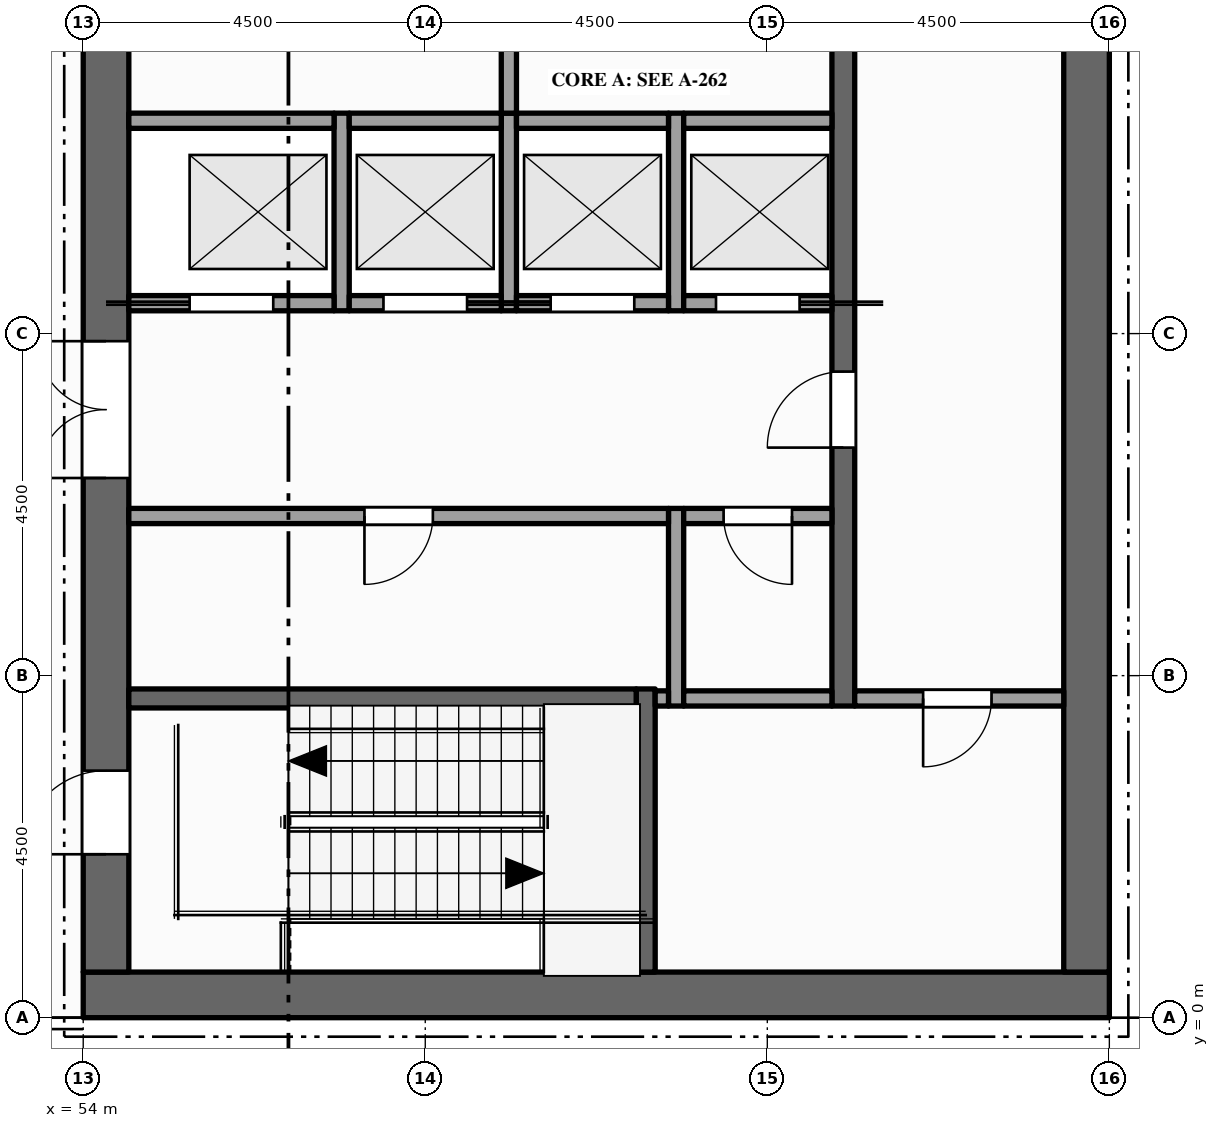
"""IFC4 building model, lengths in metres.
Left out: names, types, materials, properties, quantities, classifications, styles, units other than length and angle.
Written with IfcOpenShell. Run it as: python <this file> out.ifc"""

import sys

from ifc_helpers import new_model, si_unit, direction, frame, frame_2d, origin, place, context, subcontext, project, spatial, rectangle, extrude, element, fill, save


model = new_model("IFC4")
c1 = context("Model", 3, precision=1e-05, world=origin(), true_north=direction((0.0, 1.0)))
c2 = subcontext(c1, "Body", "Model", "MODEL_VIEW")
j1 = project(units=[si_unit("LENGTHUNIT", "METRE"), si_unit("PLANEANGLEUNIT", "RADIAN")], contexts=[c1])
p1 = place(None, origin())
s1 = spatial("IfcSite", under=j1, at=p1, CompositionType="ELEMENT")
p2 = place(p1, origin())
s2 = spatial("IfcBuilding", under=s1, at=p2, CompositionType="ELEMENT")
p3 = place(p2, frame((0.0, 0.0, 341.0)))
s3 = spatial("IfcBuildingStorey", under=s2, at=p3, CompositionType="ELEMENT", Elevation=341.0)
p4 = place(p3, frame((67.5, 0.3, -0.15), z_axis=(0.0, 0.0, 1.0), x_axis=(-1.0, 0.0, 0.0)))
e1 = element("IfcWall", 1, at=p4, inside=s3, PredefinedType="SHEAR", context=c2, shape_type="SweptSolid", body=[
    extrude(rectangle(XDim=13.5, YDim=0.6, at=frame_2d((6.75, 0.0))), origin(), (0.0, 0.0, 1.0), 4.5),
])
p5 = place(p3, frame((54.3, 0.6, -0.15), z_axis=(0.0, 0.0, 1.0), x_axis=(0.0, 1.0, 0.0)))
e2 = element("IfcWall", 2, at=p5, inside=s3, PredefinedType="SHEAR", context=c2, shape_type="SweptSolid", body=[
    extrude(rectangle(XDim=21.3, YDim=0.6, at=frame_2d((10.65, 0.0))), origin(), (0.0, 0.0, 1.0), 4.5),
])
p6 = place(p5, frame((6.5, 0.0, 0.15)))
e3 = element("IfcOpeningElement", 3, at=p6, cuts=e2, PredefinedType="OPENING", context=c2, shape_type="SweptSolid", body=[
    extrude(rectangle(XDim=1.8, YDim=2.1, at=frame_2d((0.9, 1.05))), frame((0.0, 0.31, 0.0), z_axis=(0.0, -1.0, 0.0), x_axis=(1.0, 0.0, 0.0)), (0.0, 0.0, 1.0), 0.62),
])
p7 = place(p5, frame((12.55, 0.0, 0.15)))
e4 = element("IfcOpeningElement", 4, at=p7, cuts=e2, PredefinedType="OPENING", context=c2, shape_type="SweptSolid", body=[
    extrude(rectangle(XDim=1.1, YDim=2.1, at=frame_2d((0.55, 1.05))), frame((0.0, 0.31, 0.0), z_axis=(0.0, -1.0, 0.0), x_axis=(1.0, 0.0, 0.0)), (0.0, 0.0, 1.0), 0.62),
])
p8 = place(p5, frame((1.55, 0.0, 0.15)))
e5 = element("IfcOpeningElement", 5, at=p8, cuts=e2, PredefinedType="OPENING", context=c2, shape_type="SweptSolid", body=[
    extrude(rectangle(XDim=1.1, YDim=2.1, at=frame_2d((0.55, 1.05))), frame((0.0, 0.31, 0.0), z_axis=(0.0, -1.0, 0.0), x_axis=(1.0, 0.0, 0.0)), (0.0, 0.0, 1.0), 0.62),
])
p9 = place(p5, frame((18.75, 0.0, 0.15)))
e6 = element("IfcOpeningElement", 6, at=p9, cuts=e2, PredefinedType="OPENING", context=c2, shape_type="SweptSolid", body=[
    extrude(rectangle(XDim=1.1, YDim=2.1, at=frame_2d((0.55, 1.05))), frame((0.0, 0.31, 0.0), z_axis=(0.0, -1.0, 0.0), x_axis=(1.0, 0.0, 0.0)), (0.0, 0.0, 1.0), 0.62),
])
p10 = place(p3, frame((67.2, 0.6, -0.15), z_axis=(0.0, 0.0, 1.0), x_axis=(0.0, 1.0, 0.0)))
e7 = element("IfcWall", 7, at=p10, inside=s3, PredefinedType="SHEAR", context=c2, shape_type="SweptSolid", body=[
    extrude(rectangle(XDim=21.3, YDim=0.6, at=frame_2d((10.65, 0.0))), origin(), (0.0, 0.0, 1.0), 4.5),
])
for number, where, z_axis, x_axis in (
    (8, (57.4, 9.3, 0.0), (0.0, 0.0, 1.0), (0.0, 1.0, 0.0)),
    (9, (59.6, 9.3, 0.0), (0.0, 0.0, 1.0), (0.0, 1.0, 0.0)),
):
    element("IfcWall", number, at=place(p3, frame(where, z_axis=z_axis, x_axis=x_axis)), inside=s3, PredefinedType="SOLIDWALL", context=c2, shape_type="SweptSolid", body=[
        extrude(rectangle(XDim=2.6, YDim=0.2, at=frame_2d((1.3, 0.0))), origin(), (0.0, 0.0, 1.0), 4.3),
    ])
p11 = place(p3, frame((59.6, 11.9, 0.0), z_axis=(0.0, 0.0, 1.0), x_axis=(0.0, 1.0, 0.0)))
e10 = element("IfcWall", 10, at=p11, inside=s3, PredefinedType="PARTITIONING", context=c2, shape_type="SweptSolid", body=[
    extrude(rectangle(XDim=3.6, YDim=0.2, at=frame_2d((1.8, 0.0))), origin(), (0.0, 0.0, 1.0), 4.3),
])
p12 = place(p11, frame((1.3, 0.0, 0.0)))
e11 = element("IfcOpeningElement", 11, at=p12, cuts=e10, PredefinedType="OPENING", context=c2, shape_type="SweptSolid", body=[
    extrude(rectangle(XDim=1.0, YDim=2.1, at=frame_2d((0.5, 1.05))), frame((0.0, 0.11, 0.0), z_axis=(0.0, -1.0, 0.0), x_axis=(1.0, 0.0, 0.0)), (0.0, 0.0, 1.0), 0.22),
])
p13 = place(p3, frame((61.4, 0.6, 0.0), z_axis=(0.0, 0.0, 1.0), x_axis=(0.0, 1.0, 0.0)))
e12 = element("IfcWall", 12, at=p13, inside=s3, PredefinedType="SHEAR", context=c2, shape_type="SweptSolid", body=[
    extrude(rectangle(XDim=3.725, YDim=0.25, at=frame_2d((1.862, 0.0))), origin(), (0.0, 0.0, 1.0), 4.3),
])
p14 = place(p3, frame((61.8, 4.1, 0.0), z_axis=(0.0, 0.0, 1.0), x_axis=(0.0, 1.0, 0.0)))
e13 = element("IfcWall", 13, at=p14, inside=s3, PredefinedType="PARTITIONING", context=c2, shape_type="SweptSolid", body=[
    extrude(rectangle(XDim=2.6, YDim=0.2, at=frame_2d((1.3, 0.0))), origin(), (0.0, 0.0, 1.0), 4.3),
])
p15 = place(p3, frame((61.8, 9.3, 0.0), z_axis=(0.0, 0.0, 1.0), x_axis=(0.0, 1.0, 0.0)))
e14 = element("IfcWall", 14, at=p15, inside=s3, PredefinedType="SOLIDWALL", context=c2, shape_type="SweptSolid", body=[
    extrude(rectangle(XDim=2.6, YDim=0.2, at=frame_2d((1.3, 0.0))), origin(), (0.0, 0.0, 1.0), 4.3),
])
p16 = place(p3, frame((64.0, 4.1, 0.0), z_axis=(0.0, 0.0, 1.0), x_axis=(0.0, 1.0, 0.0)))
e15 = element("IfcWall", 15, at=p16, inside=s3, PredefinedType="SHEAR", context=c2, shape_type="SweptSolid", body=[
    extrude(rectangle(XDim=14.5, YDim=0.3, at=frame_2d((7.25, 0.0))), origin(), (0.0, 0.0, 1.0), 4.3),
])
p17 = place(p16, frame((3.4, 0.0, 0.0)))
e16 = element("IfcOpeningElement", 16, at=p17, cuts=e15, PredefinedType="OPENING", context=c2, shape_type="SweptSolid", body=[
    extrude(rectangle(XDim=1.0, YDim=2.1, at=frame_2d((0.5, 1.05))), frame((0.0, 0.16, 0.0), z_axis=(0.0, -1.0, 0.0), x_axis=(1.0, 0.0, 0.0)), (0.0, 0.0, 1.0), 0.32),
])
p18 = place(p16, frame((9.1, 0.0, 0.0)))
e17 = element("IfcOpeningElement", 17, at=p18, cuts=e15, PredefinedType="OPENING", context=c2, shape_type="SweptSolid", body=[
    extrude(rectangle(XDim=1.0, YDim=2.1, at=frame_2d((0.5, 1.05))), frame((0.0, 0.16, 0.0), z_axis=(0.0, -1.0, 0.0), x_axis=(1.0, 0.0, 0.0)), (0.0, 0.0, 1.0), 0.32),
])
p19 = place(p3, frame((54.6, 4.2, 0.0), z_axis=(0.0, 0.0, 1.0), x_axis=(1.0, 0.0, 0.0)))
e18 = element("IfcWall", 18, at=p19, inside=s3, PredefinedType="SHEAR", context=c2, shape_type="SweptSolid", body=[
    extrude(rectangle(XDim=6.675, YDim=0.25, at=frame_2d((3.337, 0.0))), origin(), (0.0, 0.0, 1.0), 4.3),
])
p20 = place(p3, frame((61.525, 4.2, 0.0), z_axis=(0.0, 0.0, 1.0), x_axis=(1.0, 0.0, 0.0)))
e19 = element("IfcWall", 19, at=p20, inside=s3, PredefinedType="PARTITIONING", context=c2, shape_type="SweptSolid", body=[
    extrude(rectangle(XDim=0.175, YDim=0.2, at=frame_2d((0.087, 0.0))), origin(), (0.0, 0.0, 1.0), 4.3),
])
p21 = place(p3, frame((61.9, 4.2, 0.0), z_axis=(0.0, 0.0, 1.0), x_axis=(1.0, 0.0, 0.0)))
e20 = element("IfcWall", 20, at=p21, inside=s3, PredefinedType="PARTITIONING", context=c2, shape_type="SweptSolid", body=[
    extrude(rectangle(XDim=1.95, YDim=0.2, at=frame_2d((0.975, 0.0))), origin(), (0.0, 0.0, 1.0), 4.3),
])
p22 = place(p3, frame((64.15, 4.2, 0.0), z_axis=(0.0, 0.0, 1.0), x_axis=(1.0, 0.0, 0.0)))
e21 = element("IfcWall", 21, at=p22, inside=s3, PredefinedType="PARTITIONING", context=c2, shape_type="SweptSolid", body=[
    extrude(rectangle(XDim=2.75, YDim=0.2, at=frame_2d((1.375, 0.0))), origin(), (0.0, 0.0, 1.0), 4.3),
])
p23 = place(p22, frame((0.9, 0.0, 0.0)))
e22 = element("IfcOpeningElement", 22, at=p23, cuts=e21, PredefinedType="OPENING", context=c2, shape_type="SweptSolid", body=[
    extrude(rectangle(XDim=0.9, YDim=2.1, at=frame_2d((0.45, 1.05))), frame((0.0, 0.11, 0.0), z_axis=(0.0, -1.0, 0.0), x_axis=(1.0, 0.0, 0.0)), (0.0, 0.0, 1.0), 0.22),
])
p24 = place(p3, frame((54.6, 6.6, 0.0), z_axis=(0.0, 0.0, 1.0), x_axis=(1.0, 0.0, 0.0)))
e23 = element("IfcWall", 23, at=p24, inside=s3, PredefinedType="PARTITIONING", context=c2, shape_type="SweptSolid", body=[
    extrude(rectangle(XDim=7.1, YDim=0.2, at=frame_2d((3.55, 0.0))), origin(), (0.0, 0.0, 1.0), 4.3),
])
p25 = place(p24, frame((3.1, 0.0, 0.0)))
e24 = element("IfcOpeningElement", 24, at=p25, cuts=e23, PredefinedType="OPENING", context=c2, shape_type="SweptSolid", body=[
    extrude(rectangle(XDim=0.9, YDim=2.1, at=frame_2d((0.45, 1.05))), frame((0.0, 0.11, 0.0), z_axis=(0.0, -1.0, 0.0), x_axis=(1.0, 0.0, 0.0)), (0.0, 0.0, 1.0), 0.22),
])
p26 = place(p3, frame((61.9, 6.6, 0.0), z_axis=(0.0, 0.0, 1.0), x_axis=(1.0, 0.0, 0.0)))
e25 = element("IfcWall", 25, at=p26, inside=s3, PredefinedType="PARTITIONING", context=c2, shape_type="SweptSolid", body=[
    extrude(rectangle(XDim=1.95, YDim=0.2, at=frame_2d((0.975, 0.0))), origin(), (0.0, 0.0, 1.0), 4.3),
])
p27 = place(p26, frame((0.525, 0.0, 0.0)))
e26 = element("IfcOpeningElement", 26, at=p27, cuts=e25, PredefinedType="OPENING", context=c2, shape_type="SweptSolid", body=[
    extrude(rectangle(XDim=0.9, YDim=2.1, at=frame_2d((0.45, 1.05))), frame((0.0, 0.11, 0.0), z_axis=(0.0, -1.0, 0.0), x_axis=(1.0, 0.0, 0.0)), (0.0, 0.0, 1.0), 0.22),
])
p28 = place(p3, frame((54.6, 9.4, 0.0), z_axis=(0.0, 0.0, 1.0), x_axis=(1.0, 0.0, 0.0)))
e27 = element("IfcWall", 27, at=p28, inside=s3, PredefinedType="SOLIDWALL", context=c2, shape_type="SweptSolid", body=[
    extrude(rectangle(XDim=2.7, YDim=0.2, at=frame_2d((1.35, 0.0))), origin(), (0.0, 0.0, 1.0), 4.3),
])
p29 = place(p28, frame((0.8, 0.0, 0.012)))
e28 = element("IfcOpeningElement", 28, at=p29, cuts=e27, PredefinedType="OPENING", context=c2, shape_type="SweptSolid", body=[
    extrude(rectangle(XDim=1.1, YDim=2.1, at=frame_2d((0.55, 1.05))), frame((0.0, 0.11, 0.0), z_axis=(0.0, -1.0, 0.0), x_axis=(1.0, 0.0, 0.0)), (0.0, 0.0, 1.0), 0.22),
])
p30 = place(p3, frame((57.5, 9.4, 0.0), z_axis=(0.0, 0.0, 1.0), x_axis=(1.0, 0.0, 0.0)))
e29 = element("IfcWall", 29, at=p30, inside=s3, PredefinedType="SOLIDWALL", context=c2, shape_type="SweptSolid", body=[
    extrude(rectangle(XDim=2.0, YDim=0.2, at=frame_2d((1.0, 0.0))), origin(), (0.0, 0.0, 1.0), 4.3),
])
p31 = place(p30, frame((0.45, 0.0, 0.012)))
e30 = element("IfcOpeningElement", 30, at=p31, cuts=e29, PredefinedType="OPENING", context=c2, shape_type="SweptSolid", body=[
    extrude(rectangle(XDim=1.1, YDim=2.1, at=frame_2d((0.55, 1.05))), frame((0.0, 0.11, 0.0), z_axis=(0.0, -1.0, 0.0), x_axis=(1.0, 0.0, 0.0)), (0.0, 0.0, 1.0), 0.22),
])
p32 = place(p3, frame((59.7, 9.4, 0.0), z_axis=(0.0, 0.0, 1.0), x_axis=(1.0, 0.0, 0.0)))
e31 = element("IfcWall", 31, at=p32, inside=s3, PredefinedType="SOLIDWALL", context=c2, shape_type="SweptSolid", body=[
    extrude(rectangle(XDim=2.0, YDim=0.2, at=frame_2d((1.0, 0.0))), origin(), (0.0, 0.0, 1.0), 4.3),
])
p33 = place(p32, frame((0.45, 0.0, 0.012)))
e32 = element("IfcOpeningElement", 32, at=p33, cuts=e31, PredefinedType="OPENING", context=c2, shape_type="SweptSolid", body=[
    extrude(rectangle(XDim=1.1, YDim=2.1, at=frame_2d((0.55, 1.05))), frame((0.0, 0.11, 0.0), z_axis=(0.0, -1.0, 0.0), x_axis=(1.0, 0.0, 0.0)), (0.0, 0.0, 1.0), 0.22),
])
p34 = place(p3, frame((61.9, 9.4, 0.0), z_axis=(0.0, 0.0, 1.0), x_axis=(1.0, 0.0, 0.0)))
e33 = element("IfcWall", 33, at=p34, inside=s3, PredefinedType="SOLIDWALL", context=c2, shape_type="SweptSolid", body=[
    extrude(rectangle(XDim=1.95, YDim=0.2, at=frame_2d((0.975, 0.0))), origin(), (0.0, 0.0, 1.0), 4.3),
])
p35 = place(p34, frame((0.425, 0.0, 0.012)))
e34 = element("IfcOpeningElement", 34, at=p35, cuts=e33, PredefinedType="OPENING", context=c2, shape_type="SweptSolid", body=[
    extrude(rectangle(XDim=1.1, YDim=2.1, at=frame_2d((0.55, 1.05))), frame((0.0, 0.11, 0.0), z_axis=(0.0, -1.0, 0.0), x_axis=(1.0, 0.0, 0.0)), (0.0, 0.0, 1.0), 0.22),
])
p36 = place(p3, frame((54.6, 11.8, 0.0), z_axis=(0.0, 0.0, 1.0), x_axis=(1.0, 0.0, 0.0)))
e35 = element("IfcWall", 35, at=p36, inside=s3, PredefinedType="SOLIDWALL", context=c2, shape_type="SweptSolid", body=[
    extrude(rectangle(XDim=2.7, YDim=0.2, at=frame_2d((1.35, 0.0))), origin(), (0.0, 0.0, 1.0), 4.3),
])
for number, where, z_axis, x_axis in (
    (36, (57.5, 11.8, 0.0), (0.0, 0.0, 1.0), (1.0, 0.0, 0.0)),
    (37, (59.7, 11.8, 0.0), (0.0, 0.0, 1.0), (1.0, 0.0, 0.0)),
):
    element("IfcWall", number, at=place(p3, frame(where, z_axis=z_axis, x_axis=x_axis)), inside=s3, PredefinedType="SOLIDWALL", context=c2, shape_type="SweptSolid", body=[
        extrude(rectangle(XDim=2.0, YDim=0.2, at=frame_2d((1.0, 0.0))), origin(), (0.0, 0.0, 1.0), 4.3),
    ])
p37 = place(p3, frame((61.9, 11.8, 0.0), z_axis=(0.0, 0.0, 1.0), x_axis=(1.0, 0.0, 0.0)))
e38 = element("IfcWall", 38, at=p37, inside=s3, PredefinedType="SOLIDWALL", context=c2, shape_type="SweptSolid", body=[
    extrude(rectangle(XDim=1.95, YDim=0.2, at=frame_2d((0.975, 0.0))), origin(), (0.0, 0.0, 1.0), 4.3),
])
p38 = place(p29, origin())
e39 = element("IfcDoor", 39, at=p38, inside=s3, OperationType="SLIDING_TO_LEFT", PredefinedType="DOOR", context=c2, shape_type="SweptSolid", body=[
    extrude(rectangle(XDim=1.1, YDim=2.1, at=frame_2d((0.55, 1.05))), frame((0.0, 0.025, 0.0), z_axis=(0.0, -1.0, 0.0), x_axis=(1.0, 0.0, 0.0)), (0.0, 0.0, 1.0), 0.05),
])
fill(e28, e39)
p39 = place(p31, origin())
e40 = element("IfcDoor", 40, at=p39, inside=s3, OperationType="SLIDING_TO_RIGHT", PredefinedType="DOOR", context=c2, shape_type="SweptSolid", body=[
    extrude(rectangle(XDim=1.1, YDim=2.1, at=frame_2d((0.55, 1.05))), frame((0.0, 0.025, 0.0), z_axis=(0.0, -1.0, 0.0), x_axis=(1.0, 0.0, 0.0)), (0.0, 0.0, 1.0), 0.05),
])
fill(e30, e40)
p40 = place(p33, origin())
e41 = element("IfcDoor", 41, at=p40, inside=s3, OperationType="SLIDING_TO_LEFT", PredefinedType="DOOR", context=c2, shape_type="SweptSolid", body=[
    extrude(rectangle(XDim=1.1, YDim=2.1, at=frame_2d((0.55, 1.05))), frame((0.0, 0.025, 0.0), z_axis=(0.0, -1.0, 0.0), x_axis=(1.0, 0.0, 0.0)), (0.0, 0.0, 1.0), 0.05),
])
fill(e32, e41)
p41 = place(p35, origin())
e42 = element("IfcDoor", 42, at=p41, inside=s3, OperationType="SLIDING_TO_RIGHT", PredefinedType="DOOR", context=c2, shape_type="SweptSolid", body=[
    extrude(rectangle(XDim=1.1, YDim=2.1, at=frame_2d((0.55, 1.05))), frame((0.0, 0.025, 0.0), z_axis=(0.0, -1.0, 0.0), x_axis=(1.0, 0.0, 0.0)), (0.0, 0.0, 1.0), 0.05),
])
fill(e34, e42)
p42 = place(p6, origin())
e43 = element("IfcDoor", 43, at=p42, inside=s3, OperationType="DOUBLE_DOOR_SINGLE_SWING", PredefinedType="DOOR", context=c2, shape_type="SweptSolid", body=[
    extrude(rectangle(XDim=1.8, YDim=2.1, at=frame_2d((0.9, 1.05))), frame((0.0, 0.025, 0.0), z_axis=(0.0, -1.0, 0.0), x_axis=(1.0, 0.0, 0.0)), (0.0, 0.0, 1.0), 0.05),
])
fill(e3, e43)
p43 = place(p17, origin())
e44 = element("IfcDoor", 44, at=p43, inside=s3, OperationType="SINGLE_SWING_LEFT", PredefinedType="DOOR", context=c2, shape_type="SweptSolid", body=[
    extrude(rectangle(XDim=1.0, YDim=2.1, at=frame_2d((0.5, 1.05))), frame((0.0, 0.025, 0.0), z_axis=(0.0, -1.0, 0.0), x_axis=(1.0, 0.0, 0.0)), (0.0, 0.0, 1.0), 0.05),
])
fill(e16, e44)
p44 = place(p8, origin())
e45 = element("IfcDoor", 45, at=p44, inside=s3, OperationType="SINGLE_SWING_LEFT", PredefinedType="DOOR", context=c2, shape_type="SweptSolid", body=[
    extrude(rectangle(XDim=1.1, YDim=2.1, at=frame_2d((0.55, 1.05))), frame((0.0, 0.025, 0.0), z_axis=(0.0, -1.0, 0.0), x_axis=(1.0, 0.0, 0.0)), (0.0, 0.0, 1.0), 0.05),
])
fill(e5, e45)
p45 = place(p23, origin())
e46 = element("IfcDoor", 46, at=p45, inside=s3, OperationType="SINGLE_SWING_LEFT", PredefinedType="DOOR", context=c2, shape_type="SweptSolid", body=[
    extrude(rectangle(XDim=0.9, YDim=2.1, at=frame_2d((0.45, 1.05))), frame((0.0, 0.025, 0.0), z_axis=(0.0, -1.0, 0.0), x_axis=(1.0, 0.0, 0.0)), (0.0, 0.0, 1.0), 0.05),
])
fill(e22, e46)
p46 = place(p25, origin())
e47 = element("IfcDoor", 47, at=p46, inside=s3, OperationType="SINGLE_SWING_LEFT", PredefinedType="DOOR", context=c2, shape_type="SweptSolid", body=[
    extrude(rectangle(XDim=0.9, YDim=2.1, at=frame_2d((0.45, 1.05))), frame((0.0, 0.025, 0.0), z_axis=(0.0, -1.0, 0.0), x_axis=(1.0, 0.0, 0.0)), (0.0, 0.0, 1.0), 0.05),
])
fill(e24, e47)
p47 = place(p27, origin())
e48 = element("IfcDoor", 48, at=p47, inside=s3, OperationType="SINGLE_SWING_RIGHT", PredefinedType="DOOR", context=c2, shape_type="SweptSolid", body=[
    extrude(rectangle(XDim=0.9, YDim=2.1, at=frame_2d((0.45, 1.05))), frame((0.0, 0.025, 0.0), z_axis=(0.0, -1.0, 0.0), x_axis=(1.0, 0.0, 0.0)), (0.0, 0.0, 1.0), 0.05),
])
fill(e26, e48)
save(model, sys.argv[1])
